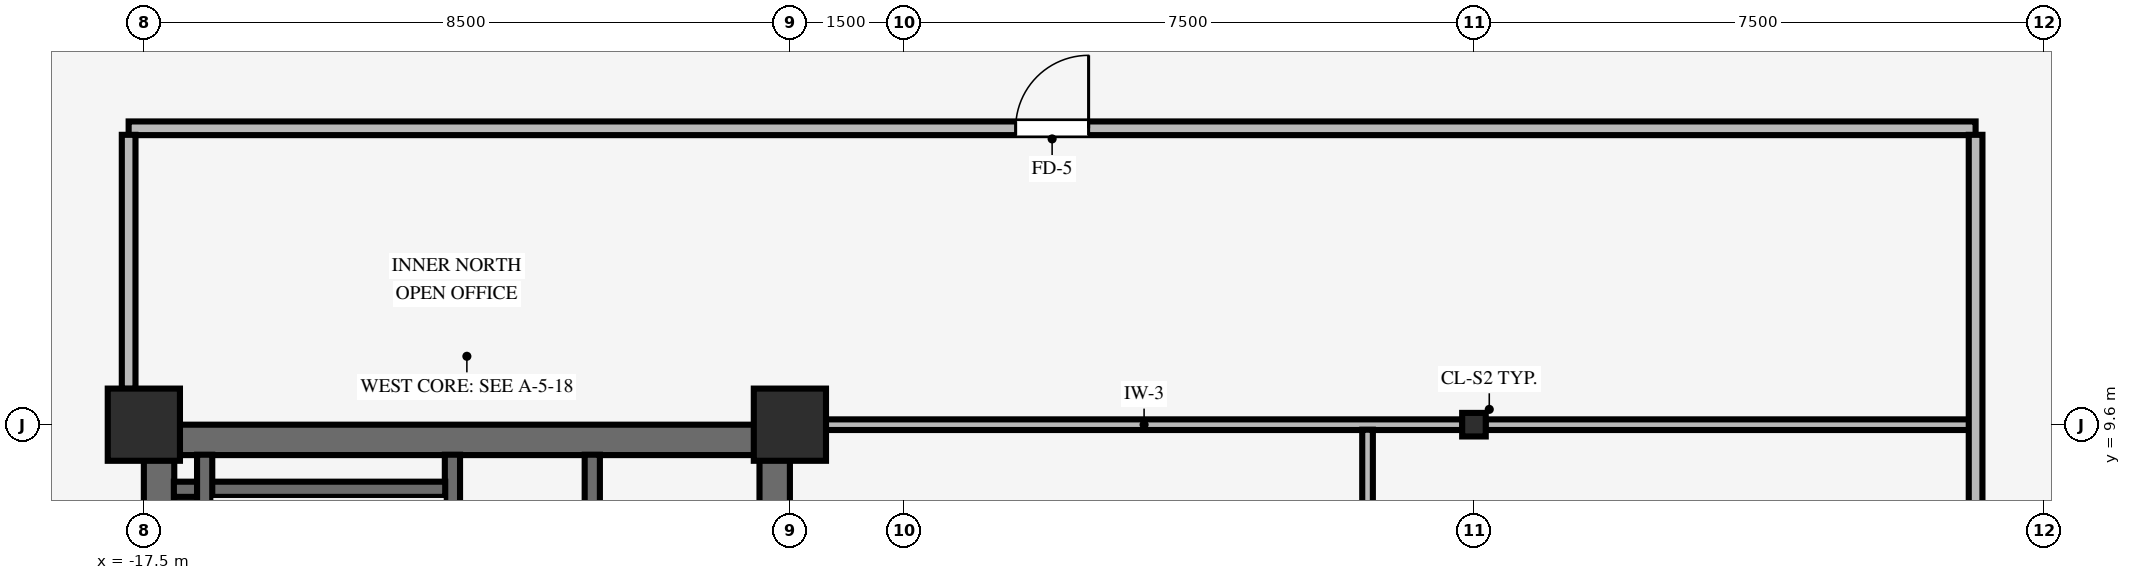
"""IFC4 building model, lengths in metres.
Left out: names, types, materials, properties, quantities, classifications, styles, units other than length and angle.
Written with IfcOpenShell. Run it as: python <this file> out.ifc"""

import sys

from ifc_helpers import new_model, si_unit, direction, frame, frame_2d, origin, origin_2d, place, context, subcontext, project, spatial, rectangle, i_section, extrude, source, transform, mapped, element, fill, save


model = new_model("IFC4")
c1 = context("Model", 3, precision=1e-05, world=origin(), true_north=direction((0.0, 1.0)))
c2 = subcontext(c1, "Body", "Model", "MODEL_VIEW")
j1 = project(units=[si_unit("LENGTHUNIT", "METRE"), si_unit("PLANEANGLEUNIT", "RADIAN")], contexts=[c1])
p1 = place(None, origin())
s1 = spatial("IfcSite", under=j1, at=p1, CompositionType="ELEMENT")
p2 = place(p1, origin())
s2 = spatial("IfcBuilding", under=s1, at=p2, CompositionType="ELEMENT")
p3 = place(p2, frame((0.0, 0.0, 178.6)))
s3 = spatial("IfcBuildingStorey", under=s2, at=p3, CompositionType="ELEMENT", Elevation=178.6)
p4 = place(p3, frame((-17.5, 9.4, 0.0), z_axis=(0.0, 0.0, 1.0), x_axis=(1.0, 0.0, 0.0)))
e1 = element("IfcWall", 1, at=p4, inside=s3, PredefinedType="SHEAR", context=c2, shape_type="SweptSolid", body=[
    extrude(rectangle(XDim=8.5, YDim=0.4, at=frame_2d((4.25, 0.0))), origin(), (0.0, 0.0, 1.0), 3.37),
])
p5 = place(p3, frame((-17.3, -9.205, 0.0), z_axis=(0.0, 0.0, 1.0), x_axis=(0.0, 1.0, 0.0)))
e2 = element("IfcWall", 2, at=p5, inside=s3, PredefinedType="SHEAR", context=c2, shape_type="SweptSolid", body=[
    extrude(rectangle(XDim=18.41, YDim=0.4, at=frame_2d((9.205, 0.0))), origin(), (0.0, 0.0, 1.0), 3.37),
])
p6 = place(p3, frame((-9.2, -9.205, 0.0), z_axis=(0.0, 0.0, 1.0), x_axis=(0.0, 1.0, 0.0)))
e3 = element("IfcWall", 3, at=p6, inside=s3, PredefinedType="SHEAR", context=c2, shape_type="SweptSolid", body=[
    extrude(rectangle(XDim=18.41, YDim=0.4, at=frame_2d((9.205, 0.0))), origin(), (0.0, 0.0, 1.0), 3.37),
])
p7 = place(p6, frame((8.605, 0.0, 0.0)))
e4 = element("IfcOpeningElement", 4, at=p7, cuts=e3, PredefinedType="OPENING", context=c2, shape_type="SweptSolid", body=[
    extrude(rectangle(XDim=1.2, YDim=2.15, at=frame_2d((0.6, 1.075))), frame((0.0, 0.21, 0.0), z_axis=(0.0, -1.0, 0.0), x_axis=(1.0, 0.0, 0.0)), (0.0, 0.0, 1.0), 0.42),
])
for number, where, z_axis, x_axis in (
    (5, (-17.5, 9.6, 0.0), (0.0, 0.0, 1.0), (1.0, 0.0, 0.0)),
    (6, (-9.0, 9.6, 0.0), (0.0, 0.0, 1.0), (1.0, 0.0, 0.0)),
):
    element("IfcColumn", number, at=place(p3, frame(where, z_axis=z_axis, x_axis=x_axis)), inside=s3, PredefinedType="COLUMN", context=c2, shape_type="SweptSolid", body=[
        extrude(rectangle(XDim=0.95, YDim=0.95, at=origin_2d()), origin(), (0.0, 0.0, 1.0), 3.37),
    ])
p8 = place(p3, frame((0.0, 9.6, 0.0), z_axis=(0.0, 0.0, 1.0), x_axis=(1.0, 0.0, 0.0)))
e7 = element("IfcColumn", 7, at=p8, inside=s3, PredefinedType="COLUMN", context=c2, shape_type="SweptSolid", body=[
    extrude(i_section(OverallWidth=0.31, OverallDepth=0.31, WebThickness=0.015, FlangeThickness=0.015, FilletRadius=0.015, at=origin_2d()), origin(), (0.0, 0.0, 1.0), 3.37),
])
p9 = place(p3, frame((-13.44, 0.9, 0.0), z_axis=(0.0, 0.0, 1.0), x_axis=(0.0, 1.0, 0.0)))
e8 = element("IfcWall", 8, at=p9, inside=s3, PredefinedType="SHEAR", context=c2, shape_type="SweptSolid", body=[
    extrude(rectangle(XDim=8.305, YDim=0.2, at=frame_2d((4.153, 0.0))), origin(), (0.0, 0.0, 1.0), 3.37),
])
p10 = place(p9, frame((1.53, 0.0, 0.0), z_axis=(0.0, 0.0, 1.0), x_axis=(-1.0, 0.0, 0.0)))
e9 = element("IfcOpeningElement", 9, at=p10, cuts=e8, PredefinedType="OPENING", context=c2, shape_type="SweptSolid", body=[
    extrude(rectangle(XDim=1.1, YDim=2.15, at=frame_2d((0.55, 1.075))), frame((0.0, 0.11, 0.0), z_axis=(0.0, -1.0, 0.0), x_axis=(1.0, 0.0, 0.0)), (0.0, 0.0, 1.0), 0.22),
])
p11 = place(p3, frame((-17.105, 8.75, 0.0), z_axis=(0.0, 0.0, 1.0), x_axis=(1.0, 0.0, 0.0)))
e10 = element("IfcWall", 10, at=p11, inside=s3, PredefinedType="SHEAR", context=c2, shape_type="SweptSolid", body=[
    extrude(rectangle(XDim=3.57, YDim=0.2, at=frame_2d((1.785, 0.0))), origin(), (0.0, 0.0, 1.0), 3.37),
])
p12 = place(p3, frame((-16.7, 1.095, 0.0), z_axis=(0.0, 0.0, 1.0), x_axis=(0.0, 1.0, 0.0)))
e11 = element("IfcWall", 11, at=p12, inside=s3, PredefinedType="SHEAR", context=c2, shape_type="SweptSolid", body=[
    extrude(rectangle(XDim=8.11, YDim=0.2, at=frame_2d((4.055, 0.0))), origin(), (0.0, 0.0, 1.0), 3.37),
])
p13 = place(p3, frame((-11.6, 1.3, 0.0), z_axis=(0.0, 0.0, 1.0), x_axis=(0.0, 1.0, 0.0)))
e12 = element("IfcWall", 12, at=p13, inside=s3, PredefinedType="SHEAR", context=c2, shape_type="SweptSolid", body=[
    extrude(rectangle(XDim=7.905, YDim=0.2, at=frame_2d((3.953, 0.0))), origin(), (0.0, 0.0, 1.0), 3.37),
])
p14 = place(p3, frame((-8.529, 9.6, 0.0), z_axis=(0.0, 0.0, 1.0), x_axis=(1.0, 0.0, 0.0)))
e13 = element("IfcWall", 13, at=p14, inside=s3, PredefinedType="PARTITIONING", context=c2, shape_type="SweptSolid", body=[
    extrude(rectangle(XDim=8.378, YDim=0.14, at=frame_2d((4.189, 0.0))), origin(), (0.0, 0.0, 1.0), 2.405),
])
p15 = place(p3, frame((0.151, 9.6, 0.0), z_axis=(0.0, 0.0, 1.0), x_axis=(1.0, 0.0, 0.0)))
e14 = element("IfcWall", 14, at=p15, inside=s3, PredefinedType="PARTITIONING", context=c2, shape_type="SweptSolid", body=[
    extrude(rectangle(XDim=6.363, YDim=0.14, at=frame_2d((3.182, 0.0))), origin(), (0.0, 0.0, 1.0), 2.405),
])
p16 = place(p3, frame((-17.7, 13.5, 0.0), z_axis=(0.0, 0.0, 1.0), x_axis=(1.0, 0.0, 0.0)))
e15 = element("IfcWall", 15, at=p16, inside=s3, PredefinedType="PARTITIONING", context=c2, shape_type="SweptSolid", body=[
    extrude(rectangle(XDim=24.3, YDim=0.18, at=frame_2d((12.15, 0.0))), origin(), (0.0, 0.0, 1.0), 3.008),
])
p17 = place(p16, frame((11.67, 0.0, 0.0)))
e16 = element("IfcOpeningElement", 16, at=p17, cuts=e15, PredefinedType="OPENING", context=c2, shape_type="SweptSolid", body=[
    extrude(rectangle(XDim=0.96, YDim=2.1, at=frame_2d((0.48, 1.05))), frame((0.0, 0.1, 0.0), z_axis=(0.0, -1.0, 0.0), x_axis=(1.0, 0.0, 0.0)), (0.0, 0.0, 1.0), 0.2),
])
p18 = place(p3, frame((-17.7, 10.071, 0.0), z_axis=(0.0, 0.0, 1.0), x_axis=(0.0, 1.0, 0.0)))
e17 = element("IfcWall", 17, at=p18, inside=s3, PredefinedType="PARTITIONING", context=c2, shape_type="SweptSolid", body=[
    extrude(rectangle(XDim=3.343, YDim=0.18, at=frame_2d((1.671, 0.0))), origin(), (0.0, 0.0, 1.0), 2.816),
])
p19 = place(p3, frame((-1.4, 1.336, 0.0), z_axis=(0.0, 0.0, 1.0), x_axis=(0.0, 1.0, 0.0)))
e18 = element("IfcWall", 18, at=p19, inside=s3, PredefinedType="PARTITIONING", context=c2, shape_type="SweptSolid", body=[
    extrude(rectangle(XDim=8.198, YDim=0.14, at=frame_2d((4.099, 0.0))), origin(), (0.0, 0.0, 1.0), 3.36),
])
p20 = place(p3, frame((6.6, 1.336, 0.0), z_axis=(0.0, 0.0, 1.0), x_axis=(0.0, 1.0, 0.0)))
e19 = element("IfcWall", 19, at=p20, inside=s3, PredefinedType="PARTITIONING", context=c2, shape_type="SweptSolid", body=[
    extrude(rectangle(XDim=12.078, YDim=0.18, at=frame_2d((6.039, 0.0))), origin(), (0.0, 0.0, 1.0), 3.36),
])
p21 = place(p20, frame((3.652, 0.0, 0.0)))
e20 = element("IfcOpeningElement", 20, at=p21, cuts=e19, PredefinedType="OPENING", context=c2, shape_type="SweptSolid", body=[
    extrude(rectangle(XDim=0.96, YDim=2.1, at=frame_2d((0.48, 1.05))), frame((0.0, 0.1, 0.0), z_axis=(0.0, -1.0, 0.0), x_axis=(1.0, 0.0, 0.0)), (0.0, 0.0, 1.0), 0.2),
])
m1 = source(origin(), c2, "Body", "SweptSolid", [
    extrude(rectangle(XDim=0.96, YDim=2.1, at=frame_2d((0.48, 1.05))), frame((0.0, 0.025, 0.0), z_axis=(0.0, -1.0, 0.0), x_axis=(1.0, 0.0, 0.0)), (0.0, 0.0, 1.0), 0.05),
])
p22 = place(p17, origin())
e21 = element("IfcDoor", 21, at=p22, inside=s3, OperationType="SINGLE_SWING_RIGHT", PredefinedType="DOOR", context=c2, shape_type="MappedRepresentation", body=[
    mapped(m1, transform((0.0, 0.0, 0.0), scale=1.0)),
])
fill(e16, e21)
save(model, sys.argv[1])
